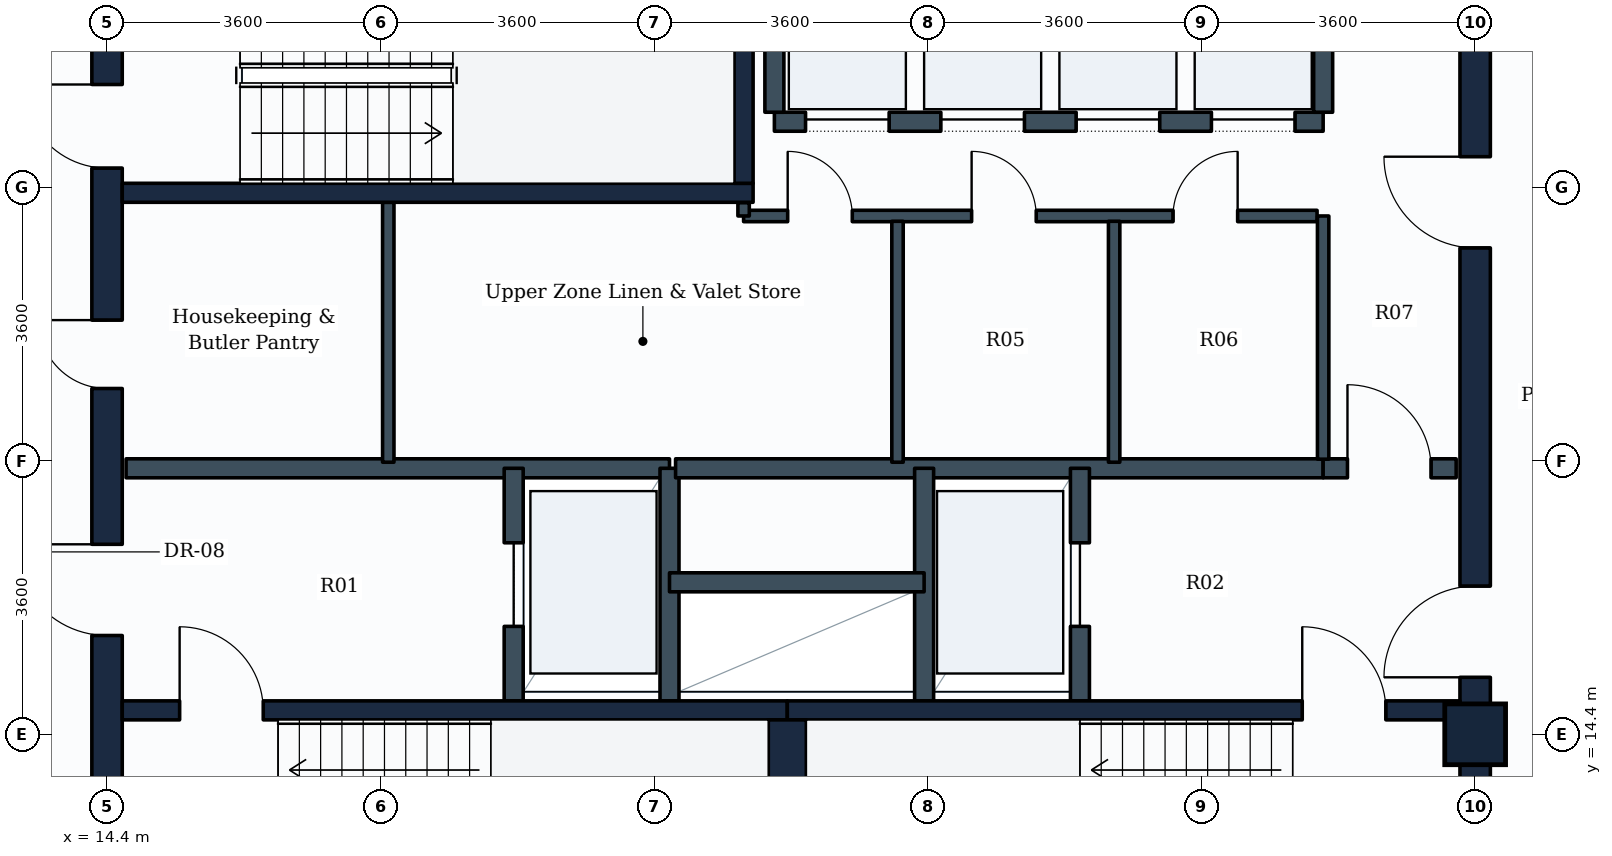
"""IFC4 building model, lengths in metres.
Left out: names, types, materials, properties, quantities, classifications, styles, units other than length and angle.
Written with IfcOpenShell. Run it as: python <this file> out.ifc"""

import sys

from ifc_helpers import new_model, si_unit, direction, frame, frame_2d, origin, origin_2d, place, context, subcontext, project, spatial, rectangle, extrude, element, fill, save


model = new_model("IFC4")
c1 = context("Model", 3, precision=1e-05, world=origin(), true_north=direction((0.0, 1.0)))
c2 = subcontext(c1, "Body", "Model", "MODEL_VIEW")
j1 = project(units=[si_unit("LENGTHUNIT", "METRE"), si_unit("PLANEANGLEUNIT", "RADIAN")], contexts=[c1])
p1 = place(None, origin())
s1 = spatial("IfcSite", under=j1, at=p1, CompositionType="ELEMENT")
p2 = place(p1, origin())
s2 = spatial("IfcBuilding", under=s1, at=p2, CompositionType="ELEMENT")
p3 = place(p2, frame((0.0, 0.0, 284.6)))
s3 = spatial("IfcBuildingStorey", under=s2, at=p3, CompositionType="ELEMENT", Elevation=284.6)
p4 = place(p3, frame((32.4, 14.4, 0.0), z_axis=(0.0, 0.0, 1.0), x_axis=(1.0, 0.0, 0.0)))
e1 = element("IfcColumn", 1, at=p4, inside=s3, PredefinedType="COLUMN", context=c2, shape_type="SweptSolid", body=[
    extrude(rectangle(XDim=0.8, YDim=0.8, at=origin_2d()), origin(), (0.0, 0.0, 1.0), 3.6),
])
p5 = place(p3, frame((14.4, 10.8, 0.0), z_axis=(0.0, 0.0, 1.0), x_axis=(0.0, 1.0, 0.0)))
e2 = element("IfcWall", 2, at=p5, inside=s3, PredefinedType="SHEAR", context=c2, shape_type="SweptSolid", body=[
    extrude(rectangle(XDim=14.4, YDim=0.4, at=frame_2d((7.2, 0.0))), origin(), (0.0, 0.0, 1.0), 3.35),
])
p6 = place(p5, frame((11.05, 0.0, 0.0)))
e3 = element("IfcOpeningElement", 3, at=p6, cuts=e2, PredefinedType="OPENING", context=c2, shape_type="SweptSolid", body=[
    extrude(rectangle(XDim=1.1, YDim=2.1, at=frame_2d((0.55, 1.05))), frame((0.0, 0.21, 0.0), z_axis=(0.0, -1.0, 0.0), x_axis=(1.0, 0.0, 0.0)), (0.0, 0.0, 1.0), 0.42),
])
p7 = place(p5, frame((4.9, 0.0, 0.0)))
e4 = element("IfcOpeningElement", 4, at=p7, cuts=e2, PredefinedType="OPENING", context=c2, shape_type="SweptSolid", body=[
    extrude(rectangle(XDim=1.2, YDim=2.1, at=frame_2d((0.6, 1.05))), frame((0.0, 0.21, 0.0), z_axis=(0.0, -1.0, 0.0), x_axis=(1.0, 0.0, 0.0)), (0.0, 0.0, 1.0), 0.42),
])
p8 = place(p5, frame((8.15, 0.0, 0.0)))
e5 = element("IfcOpeningElement", 5, at=p8, cuts=e2, PredefinedType="OPENING", context=c2, shape_type="SweptSolid", body=[
    extrude(rectangle(XDim=0.9, YDim=2.1, at=frame_2d((0.45, 1.05))), frame((0.0, 0.21, 0.0), z_axis=(0.0, -1.0, 0.0), x_axis=(1.0, 0.0, 0.0)), (0.0, 0.0, 1.0), 0.42),
])
p9 = place(p3, frame((32.4, 10.8, 0.0), z_axis=(0.0, 0.0, 1.0), x_axis=(0.0, 1.0, 0.0)))
e6 = element("IfcWall", 6, at=p9, inside=s3, PredefinedType="SHEAR", context=c2, shape_type="SweptSolid", body=[
    extrude(rectangle(XDim=14.4, YDim=0.4, at=frame_2d((7.2, 0.0))), origin(), (0.0, 0.0, 1.0), 3.35),
])
p10 = place(p9, frame((4.35, 0.0, 0.0)))
e7 = element("IfcOpeningElement", 7, at=p10, cuts=e6, PredefinedType="OPENING", context=c2, shape_type="SweptSolid", body=[
    extrude(rectangle(XDim=1.2, YDim=2.1, at=frame_2d((0.6, 1.05))), frame((0.0, 0.21, 0.0), z_axis=(0.0, -1.0, 0.0), x_axis=(1.0, 0.0, 0.0)), (0.0, 0.0, 1.0), 0.42),
])
p11 = place(p9, frame((10.0, 0.0, 0.0)))
e8 = element("IfcOpeningElement", 8, at=p11, cuts=e6, PredefinedType="OPENING", context=c2, shape_type="SweptSolid", body=[
    extrude(rectangle(XDim=1.2, YDim=2.1, at=frame_2d((0.6, 1.05))), frame((0.0, 0.21, 0.0), z_axis=(0.0, -1.0, 0.0), x_axis=(1.0, 0.0, 0.0)), (0.0, 0.0, 1.0), 0.42),
])
p12 = place(p3, frame((14.6, 14.715, 0.0), z_axis=(0.0, 0.0, 1.0), x_axis=(1.0, 0.0, 0.0)))
e9 = element("IfcWall", 9, at=p12, inside=s3, PredefinedType="SHEAR", context=c2, shape_type="SweptSolid", body=[
    extrude(rectangle(XDim=8.75, YDim=0.25, at=frame_2d((4.375, 0.0))), origin(), (0.0, 0.0, 1.0), 3.35),
])
p13 = place(p12, frame((0.755, 0.0, 0.0)))
e10 = element("IfcOpeningElement", 10, at=p13, cuts=e9, PredefinedType="OPENING", context=c2, shape_type="SweptSolid", body=[
    extrude(rectangle(XDim=1.1, YDim=2.1, at=frame_2d((0.55, 1.05))), frame((0.0, 0.135, 0.0), z_axis=(0.0, -1.0, 0.0), x_axis=(1.0, 0.0, 0.0)), (0.0, 0.0, 1.0), 0.27),
])
p14 = place(p3, frame((23.35, 14.715, 0.0), z_axis=(0.0, 0.0, 1.0), x_axis=(1.0, 0.0, 0.0)))
e11 = element("IfcWall", 11, at=p14, inside=s3, PredefinedType="SHEAR", context=c2, shape_type="SweptSolid", body=[
    extrude(rectangle(XDim=8.85, YDim=0.25, at=frame_2d((4.425, 0.0))), origin(), (0.0, 0.0, 1.0), 3.35),
])
p15 = place(p14, frame((6.775, 0.0, 0.0)))
e12 = element("IfcOpeningElement", 12, at=p15, cuts=e11, PredefinedType="OPENING", context=c2, shape_type="SweptSolid", body=[
    extrude(rectangle(XDim=1.1, YDim=2.1, at=frame_2d((0.55, 1.05))), frame((0.0, 0.135, 0.0), z_axis=(0.0, -1.0, 0.0), x_axis=(1.0, 0.0, 0.0)), (0.0, 0.0, 1.0), 0.27),
])
p16 = place(p3, frame((23.35, 11.75, 0.0), z_axis=(0.0, 0.0, 1.0), x_axis=(0.0, 1.0, 0.0)))
e13 = element("IfcWall", 13, at=p16, inside=s3, PredefinedType="SHEAR", context=c2, shape_type="SweptSolid", body=[
    extrude(rectangle(XDim=2.84, YDim=0.5, at=frame_2d((1.42, 0.0))), origin(), (0.0, 0.0, 1.0), 3.35),
])
p17 = place(p3, frame((14.6, 21.525, 0.0), z_axis=(0.0, 0.0, 1.0), x_axis=(1.0, 0.0, 0.0)))
e14 = element("IfcWall", 14, at=p17, inside=s3, PredefinedType="SHEAR", context=c2, shape_type="SweptSolid", body=[
    extrude(rectangle(XDim=8.3, YDim=0.25, at=frame_2d((4.15, 0.0))), origin(), (0.0, 0.0, 1.0), 3.35),
])
p18 = place(p3, frame((22.775, 21.65, 0.0), z_axis=(0.0, 0.0, 1.0), x_axis=(0.0, 1.0, 0.0)))
e15 = element("IfcWall", 15, at=p18, inside=s3, PredefinedType="SHEAR", context=c2, shape_type="SweptSolid", body=[
    extrude(rectangle(XDim=2.84, YDim=0.25, at=frame_2d((1.42, 0.0))), origin(), (0.0, 0.0, 1.0), 3.35),
])
p19 = place(p3, frame((14.65, 17.9, 0.0), z_axis=(0.0, 0.0, 1.0), x_axis=(1.0, 0.0, 0.0)))
e16 = element("IfcWall", 16, at=p19, inside=s3, PredefinedType="PARTITIONING", context=c2, shape_type="SweptSolid", body=[
    extrude(rectangle(XDim=7.15, YDim=0.25, at=frame_2d((3.575, 0.0))), origin(), (0.0, 0.0, 1.0), 3.335),
])
p20 = place(p3, frame((19.75, 14.84, 0.0), z_axis=(0.0, 0.0, 1.0), x_axis=(0.0, 1.0, 0.0)))
e17 = element("IfcWall", 17, at=p20, inside=s3, PredefinedType="PARTITIONING", context=c2, shape_type="SweptSolid", body=[
    extrude(rectangle(XDim=3.06, YDim=0.25, at=frame_2d((1.53, 0.0))), origin(), (0.0, 0.0, 1.0), 3.335),
])
p21 = place(p20, frame((0.98, 0.0, 0.0)))
e18 = element("IfcOpeningElement", 18, at=p21, cuts=e17, PredefinedType="OPENING", context=c2, shape_type="SweptSolid", body=[
    extrude(rectangle(XDim=1.1, YDim=2.1, at=frame_2d((0.55, 1.05))), frame((0.0, 0.135, 0.0), z_axis=(0.0, -1.0, 0.0), x_axis=(1.0, 0.0, 0.0)), (0.0, 0.0, 1.0), 0.27),
])
p22 = place(p3, frame((21.8, 14.84, 0.0), z_axis=(0.0, 0.0, 1.0), x_axis=(0.0, 1.0, 0.0)))
e19 = element("IfcWall", 19, at=p22, inside=s3, PredefinedType="PARTITIONING", context=c2, shape_type="SweptSolid", body=[
    extrude(rectangle(XDim=3.06, YDim=0.25, at=frame_2d((1.53, 0.0))), origin(), (0.0, 0.0, 1.0), 3.335),
])
p23 = place(p3, frame((21.88, 17.9, 0.0), z_axis=(0.0, 0.0, 1.0), x_axis=(1.0, 0.0, 0.0)))
e20 = element("IfcWall", 20, at=p23, inside=s3, PredefinedType="PARTITIONING", context=c2, shape_type="SweptSolid", body=[
    extrude(rectangle(XDim=8.52, YDim=0.25, at=frame_2d((4.26, 0.0))), origin(), (0.0, 0.0, 1.0), 3.335),
])
p24 = place(p3, frame((30.4, 17.9, 0.0), z_axis=(0.0, 0.0, 1.0), x_axis=(1.0, 0.0, 0.0)))
e21 = element("IfcWall", 21, at=p24, inside=s3, PredefinedType="PARTITIONING", context=c2, shape_type="SweptSolid", body=[
    extrude(rectangle(XDim=1.75, YDim=0.25, at=frame_2d((0.875, 0.0))), origin(), (0.0, 0.0, 1.0), 3.335),
])
p25 = place(p24, frame((0.32, 0.0, 0.0)))
e22 = element("IfcOpeningElement", 22, at=p25, cuts=e21, PredefinedType="OPENING", context=c2, shape_type="SweptSolid", body=[
    extrude(rectangle(XDim=1.1, YDim=2.1, at=frame_2d((0.55, 1.05))), frame((0.0, 0.135, 0.0), z_axis=(0.0, -1.0, 0.0), x_axis=(1.0, 0.0, 0.0)), (0.0, 0.0, 1.0), 0.27),
])
p26 = place(p3, frame((25.15, 14.84, 0.0), z_axis=(0.0, 0.0, 1.0), x_axis=(0.0, 1.0, 0.0)))
e23 = element("IfcWall", 23, at=p26, inside=s3, PredefinedType="PARTITIONING", context=c2, shape_type="SweptSolid", body=[
    extrude(rectangle(XDim=3.06, YDim=0.25, at=frame_2d((1.53, 0.0))), origin(), (0.0, 0.0, 1.0), 3.335),
])
p27 = place(p3, frame((27.2, 14.84, 0.0), z_axis=(0.0, 0.0, 1.0), x_axis=(0.0, 1.0, 0.0)))
e24 = element("IfcWall", 24, at=p27, inside=s3, PredefinedType="PARTITIONING", context=c2, shape_type="SweptSolid", body=[
    extrude(rectangle(XDim=3.06, YDim=0.25, at=frame_2d((1.53, 0.0))), origin(), (0.0, 0.0, 1.0), 3.335),
])
p28 = place(p27, frame((0.98, 0.0, 0.0)))
e25 = element("IfcOpeningElement", 25, at=p28, cuts=e24, PredefinedType="OPENING", context=c2, shape_type="SweptSolid", body=[
    extrude(rectangle(XDim=1.1, YDim=2.1, at=frame_2d((0.55, 1.05))), frame((0.0, 0.135, 0.0), z_axis=(0.0, -1.0, 0.0), x_axis=(1.0, 0.0, 0.0)), (0.0, 0.0, 1.0), 0.27),
])
p29 = place(p3, frame((21.8, 16.4, 0.0), z_axis=(0.0, 0.0, 1.0), x_axis=(1.0, 0.0, 0.0)))
e26 = element("IfcWall", 26, at=p29, inside=s3, PredefinedType="PARTITIONING", context=c2, shape_type="SweptSolid", body=[
    extrude(rectangle(XDim=3.35, YDim=0.25, at=frame_2d((1.675, 0.0))), origin(), (0.0, 0.0, 1.0), 3.335),
])
p30 = place(p3, frame((23.18, 22.46, 0.0), z_axis=(0.0, 0.0, 1.0), x_axis=(1.0, 0.0, 0.0)))
e27 = element("IfcWall", 27, at=p30, inside=s3, PredefinedType="PARTITIONING", context=c2, shape_type="SweptSolid", body=[
    extrude(rectangle(XDim=7.22, YDim=0.25, at=frame_2d((3.61, 0.0))), origin(), (0.0, 0.0, 1.0), 3.335),
])
p31 = place(p30, frame((0.41, 0.0, 0.0)))
e28 = element("IfcOpeningElement", 28, at=p31, cuts=e27, PredefinedType="OPENING", context=c2, shape_type="SweptSolid", body=[
    extrude(rectangle(XDim=1.1, YDim=2.1, at=frame_2d((0.55, 1.05))), frame((0.0, 0.135, 0.0), z_axis=(0.0, -1.0, 0.0), x_axis=(1.0, 0.0, 0.0)), (0.0, 0.0, 1.0), 0.27),
])
p32 = place(p30, frame((2.19, 0.0, 0.0)))
e29 = element("IfcOpeningElement", 29, at=p32, cuts=e27, PredefinedType="OPENING", context=c2, shape_type="SweptSolid", body=[
    extrude(rectangle(XDim=1.1, YDim=2.1, at=frame_2d((0.55, 1.05))), frame((0.0, 0.135, 0.0), z_axis=(0.0, -1.0, 0.0), x_axis=(1.0, 0.0, 0.0)), (0.0, 0.0, 1.0), 0.27),
])
p33 = place(p30, frame((3.97, 0.0, 0.0)))
e30 = element("IfcOpeningElement", 30, at=p33, cuts=e27, PredefinedType="OPENING", context=c2, shape_type="SweptSolid", body=[
    extrude(rectangle(XDim=1.1, YDim=2.1, at=frame_2d((0.55, 1.05))), frame((0.0, 0.135, 0.0), z_axis=(0.0, -1.0, 0.0), x_axis=(1.0, 0.0, 0.0)), (0.0, 0.0, 1.0), 0.27),
])
p34 = place(p30, frame((5.75, 0.0, 0.0)))
e31 = element("IfcOpeningElement", 31, at=p34, cuts=e27, PredefinedType="OPENING", context=c2, shape_type="SweptSolid", body=[
    extrude(rectangle(XDim=1.1, YDim=2.1, at=frame_2d((0.55, 1.05))), frame((0.0, 0.135, 0.0), z_axis=(0.0, -1.0, 0.0), x_axis=(1.0, 0.0, 0.0)), (0.0, 0.0, 1.0), 0.27),
])
for number, where, z_axis, x_axis in (
    (32, (23.18, 22.585, 0.0), (0.0, 0.0, 1.0), (0.0, 1.0, 0.0)),
    (33, (30.4, 22.585, 0.0), (0.0, 0.0, 1.0), (0.0, 1.0, 0.0)),
):
    element("IfcWall", number, at=place(p3, frame(where, z_axis=z_axis, x_axis=x_axis)), inside=s3, PredefinedType="PARTITIONING", context=c2, shape_type="SweptSolid", body=[
        extrude(rectangle(XDim=2.315, YDim=0.25, at=frame_2d((1.157, 0.0))), origin(), (0.0, 0.0, 1.0), 3.335),
    ])
p35 = place(p3, frame((22.775, 21.22, 0.0), z_axis=(0.0, 0.0, 1.0), x_axis=(1.0, 0.0, 0.0)))
e34 = element("IfcWall", 34, at=p35, inside=s3, PredefinedType="PARTITIONING", context=c2, shape_type="SweptSolid", body=[
    extrude(rectangle(XDim=7.545, YDim=0.15, at=frame_2d((3.772, 0.0))), origin(), (0.0, 0.0, 1.0), 3.335),
])
p36 = place(p35, frame((0.58, 0.0, 0.0)))
e35 = element("IfcOpeningElement", 35, at=p36, cuts=e34, PredefinedType="OPENING", context=c2, shape_type="SweptSolid", body=[
    extrude(rectangle(XDim=0.85, YDim=2.1, at=frame_2d((0.425, 1.05))), frame((0.0, 0.085, 0.0), z_axis=(0.0, -1.0, 0.0), x_axis=(1.0, 0.0, 0.0)), (0.0, 0.0, 1.0), 0.17),
])
p37 = place(p35, frame((3.0, 0.0, 0.0)))
e36 = element("IfcOpeningElement", 36, at=p37, cuts=e34, PredefinedType="OPENING", context=c2, shape_type="SweptSolid", body=[
    extrude(rectangle(XDim=0.85, YDim=2.1, at=frame_2d((0.425, 1.05))), frame((0.0, 0.085, 0.0), z_axis=(0.0, -1.0, 0.0), x_axis=(1.0, 0.0, 0.0)), (0.0, 0.0, 1.0), 0.17),
])
p38 = place(p35, frame((5.65, 0.0, 0.0)))
e37 = element("IfcOpeningElement", 37, at=p38, cuts=e34, PredefinedType="OPENING", context=c2, shape_type="SweptSolid", body=[
    extrude(rectangle(XDim=0.85, YDim=2.1, at=frame_2d((0.425, 1.05))), frame((0.0, 0.085, 0.0), z_axis=(0.0, -1.0, 0.0), x_axis=(1.0, 0.0, 0.0)), (0.0, 0.0, 1.0), 0.17),
])
p39 = place(p3, frame((22.775, 21.22, 0.0), z_axis=(0.0, 0.0, 1.0), x_axis=(0.0, 1.0, 0.0)))
e38 = element("IfcWall", 38, at=p39, inside=s3, PredefinedType="PARTITIONING", context=c2, shape_type="SweptSolid", body=[
    extrude(rectangle(XDim=0.175, YDim=0.15, at=frame_2d((0.087, 0.0))), origin(), (0.0, 0.0, 1.0), 3.335),
])
p40 = place(p3, frame((30.4, 18.02, 0.0), z_axis=(0.0, 0.0, 1.0), x_axis=(0.0, 1.0, 0.0)))
e39 = element("IfcWall", 39, at=p40, inside=s3, PredefinedType="PARTITIONING", context=c2, shape_type="SweptSolid", body=[
    extrude(rectangle(XDim=3.2, YDim=0.15, at=frame_2d((1.6, 0.0))), origin(), (0.0, 0.0, 1.0), 3.335),
])
p41 = place(p3, frame((18.1, 17.98, 0.0), z_axis=(0.0, 0.0, 1.0), x_axis=(0.0, 1.0, 0.0)))
e40 = element("IfcWall", 40, at=p41, inside=s3, PredefinedType="PARTITIONING", context=c2, shape_type="SweptSolid", body=[
    extrude(rectangle(XDim=3.42, YDim=0.15, at=frame_2d((1.71, 0.0))), origin(), (0.0, 0.0, 1.0), 3.335),
])
for number, where, z_axis, x_axis in (
    (41, (24.8, 17.98, 0.0), (0.0, 0.0, 1.0), (0.0, 1.0, 0.0)),
    (42, (27.65, 17.98, 0.0), (0.0, 0.0, 1.0), (0.0, 1.0, 0.0)),
):
    element("IfcWall", number, at=place(p3, frame(where, z_axis=z_axis, x_axis=x_axis)), inside=s3, PredefinedType="PARTITIONING", context=c2, shape_type="SweptSolid", body=[
        extrude(rectangle(XDim=3.17, YDim=0.15, at=frame_2d((1.585, 0.0))), origin(), (0.0, 0.0, 1.0), 3.335),
    ])
p42 = place(p13, origin())
e43 = element("IfcDoor", 43, at=p42, inside=s3, OperationType="SINGLE_SWING_LEFT", PredefinedType="DOOR", context=c2, shape_type="SweptSolid", body=[
    extrude(rectangle(XDim=1.1, YDim=2.1, at=frame_2d((0.55, 1.05))), frame((0.0, 0.025, 0.0), z_axis=(0.0, -1.0, 0.0), x_axis=(1.0, 0.0, 0.0)), (0.0, 0.0, 1.0), 0.05),
])
fill(e10, e43)
p43 = place(p15, origin())
e44 = element("IfcDoor", 44, at=p43, inside=s3, OperationType="SINGLE_SWING_LEFT", PredefinedType="DOOR", context=c2, shape_type="SweptSolid", body=[
    extrude(rectangle(XDim=1.1, YDim=2.1, at=frame_2d((0.55, 1.05))), frame((0.0, 0.025, 0.0), z_axis=(0.0, -1.0, 0.0), x_axis=(1.0, 0.0, 0.0)), (0.0, 0.0, 1.0), 0.05),
])
fill(e12, e44)
p44 = place(p6, origin())
e45 = element("IfcDoor", 45, at=p44, inside=s3, OperationType="SINGLE_SWING_RIGHT", PredefinedType="DOOR", context=c2, shape_type="SweptSolid", body=[
    extrude(rectangle(XDim=1.1, YDim=2.1, at=frame_2d((0.55, 1.05))), frame((0.0, 0.025, 0.0), z_axis=(0.0, -1.0, 0.0), x_axis=(1.0, 0.0, 0.0)), (0.0, 0.0, 1.0), 0.05),
])
fill(e3, e45)
p45 = place(p21, origin())
e46 = element("IfcDoor", 46, at=p45, inside=s3, OperationType="SLIDING_TO_LEFT", PredefinedType="DOOR", context=c2, shape_type="SweptSolid", body=[
    extrude(rectangle(XDim=1.1, YDim=2.1, at=frame_2d((0.55, 1.05))), frame((0.0, 0.025, 0.0), z_axis=(0.0, -1.0, 0.0), x_axis=(1.0, 0.0, 0.0)), (0.0, 0.0, 1.0), 0.05),
])
fill(e18, e46)
p46 = place(p28, origin())
e47 = element("IfcDoor", 47, at=p46, inside=s3, OperationType="SLIDING_TO_LEFT", PredefinedType="DOOR", context=c2, shape_type="SweptSolid", body=[
    extrude(rectangle(XDim=1.1, YDim=2.1, at=frame_2d((0.55, 1.05))), frame((0.0, 0.025, 0.0), z_axis=(0.0, -1.0, 0.0), x_axis=(1.0, 0.0, 0.0)), (0.0, 0.0, 1.0), 0.05),
])
fill(e25, e47)
p47 = place(p7, origin())
e48 = element("IfcDoor", 48, at=p47, inside=s3, OperationType="SINGLE_SWING_RIGHT", PredefinedType="DOOR", context=c2, shape_type="SweptSolid", body=[
    extrude(rectangle(XDim=1.2, YDim=2.1, at=frame_2d((0.6, 1.05))), frame((0.0, 0.025, 0.0), z_axis=(0.0, -1.0, 0.0), x_axis=(1.0, 0.0, 0.0)), (0.0, 0.0, 1.0), 0.05),
])
fill(e4, e48)
p48 = place(p10, origin())
e49 = element("IfcDoor", 49, at=p48, inside=s3, OperationType="SINGLE_SWING_LEFT", PredefinedType="DOOR", context=c2, shape_type="SweptSolid", body=[
    extrude(rectangle(XDim=1.2, YDim=2.1, at=frame_2d((0.6, 1.05))), frame((0.0, 0.025, 0.0), z_axis=(0.0, -1.0, 0.0), x_axis=(1.0, 0.0, 0.0)), (0.0, 0.0, 1.0), 0.05),
])
fill(e7, e49)
p49 = place(p25, origin())
e50 = element("IfcDoor", 50, at=p49, inside=s3, OperationType="SINGLE_SWING_LEFT", PredefinedType="DOOR", context=c2, shape_type="SweptSolid", body=[
    extrude(rectangle(XDim=1.1, YDim=2.1, at=frame_2d((0.55, 1.05))), frame((0.0, 0.025, 0.0), z_axis=(0.0, -1.0, 0.0), x_axis=(1.0, 0.0, 0.0)), (0.0, 0.0, 1.0), 0.05),
])
fill(e22, e50)
p50 = place(p31, origin())
e51 = element("IfcDoor", 51, at=p50, inside=s3, OperationType="SLIDING_TO_LEFT", PredefinedType="DOOR", context=c2, shape_type="SweptSolid", body=[
    extrude(rectangle(XDim=1.1, YDim=2.1, at=frame_2d((0.55, 1.05))), frame((0.0, 0.025, 0.0), z_axis=(0.0, -1.0, 0.0), x_axis=(1.0, 0.0, 0.0)), (0.0, 0.0, 1.0), 0.05),
])
fill(e28, e51)
p51 = place(p32, origin())
e52 = element("IfcDoor", 52, at=p51, inside=s3, OperationType="SLIDING_TO_LEFT", PredefinedType="DOOR", context=c2, shape_type="SweptSolid", body=[
    extrude(rectangle(XDim=1.1, YDim=2.1, at=frame_2d((0.55, 1.05))), frame((0.0, 0.025, 0.0), z_axis=(0.0, -1.0, 0.0), x_axis=(1.0, 0.0, 0.0)), (0.0, 0.0, 1.0), 0.05),
])
fill(e29, e52)
p52 = place(p33, origin())
e53 = element("IfcDoor", 53, at=p52, inside=s3, OperationType="SLIDING_TO_LEFT", PredefinedType="DOOR", context=c2, shape_type="SweptSolid", body=[
    extrude(rectangle(XDim=1.1, YDim=2.1, at=frame_2d((0.55, 1.05))), frame((0.0, 0.025, 0.0), z_axis=(0.0, -1.0, 0.0), x_axis=(1.0, 0.0, 0.0)), (0.0, 0.0, 1.0), 0.05),
])
fill(e30, e53)
p53 = place(p34, origin())
e54 = element("IfcDoor", 54, at=p53, inside=s3, OperationType="SLIDING_TO_LEFT", PredefinedType="DOOR", context=c2, shape_type="SweptSolid", body=[
    extrude(rectangle(XDim=1.1, YDim=2.1, at=frame_2d((0.55, 1.05))), frame((0.0, 0.025, 0.0), z_axis=(0.0, -1.0, 0.0), x_axis=(1.0, 0.0, 0.0)), (0.0, 0.0, 1.0), 0.05),
])
fill(e31, e54)
p54 = place(p11, origin())
e55 = element("IfcDoor", 55, at=p54, inside=s3, OperationType="SINGLE_SWING_RIGHT", PredefinedType="DOOR", context=c2, shape_type="SweptSolid", body=[
    extrude(rectangle(XDim=1.2, YDim=2.1, at=frame_2d((0.6, 1.05))), frame((0.0, 0.025, 0.0), z_axis=(0.0, -1.0, 0.0), x_axis=(1.0, 0.0, 0.0)), (0.0, 0.0, 1.0), 0.05),
])
fill(e8, e55)
p55 = place(p8, origin())
e56 = element("IfcDoor", 56, at=p55, inside=s3, OperationType="SINGLE_SWING_RIGHT", PredefinedType="DOOR", context=c2, shape_type="SweptSolid", body=[
    extrude(rectangle(XDim=0.9, YDim=2.1, at=frame_2d((0.45, 1.05))), frame((0.0, 0.025, 0.0), z_axis=(0.0, -1.0, 0.0), x_axis=(1.0, 0.0, 0.0)), (0.0, 0.0, 1.0), 0.05),
])
fill(e5, e56)
p56 = place(p36, origin())
e57 = element("IfcDoor", 57, at=p56, inside=s3, OperationType="SINGLE_SWING_LEFT", PredefinedType="DOOR", context=c2, shape_type="SweptSolid", body=[
    extrude(rectangle(XDim=0.85, YDim=2.1, at=frame_2d((0.425, 1.05))), frame((0.0, 0.025, 0.0), z_axis=(0.0, -1.0, 0.0), x_axis=(1.0, 0.0, 0.0)), (0.0, 0.0, 1.0), 0.05),
])
fill(e35, e57)
p57 = place(p37, origin())
e58 = element("IfcDoor", 58, at=p57, inside=s3, OperationType="SINGLE_SWING_LEFT", PredefinedType="DOOR", context=c2, shape_type="SweptSolid", body=[
    extrude(rectangle(XDim=0.85, YDim=2.1, at=frame_2d((0.425, 1.05))), frame((0.0, 0.025, 0.0), z_axis=(0.0, -1.0, 0.0), x_axis=(1.0, 0.0, 0.0)), (0.0, 0.0, 1.0), 0.05),
])
fill(e36, e58)
p58 = place(p38, origin())
e59 = element("IfcDoor", 59, at=p58, inside=s3, OperationType="SINGLE_SWING_RIGHT", PredefinedType="DOOR", context=c2, shape_type="SweptSolid", body=[
    extrude(rectangle(XDim=0.85, YDim=2.1, at=frame_2d((0.425, 1.05))), frame((0.0, 0.025, 0.0), z_axis=(0.0, -1.0, 0.0), x_axis=(1.0, 0.0, 0.0)), (0.0, 0.0, 1.0), 0.05),
])
fill(e37, e59)
save(model, sys.argv[1])
